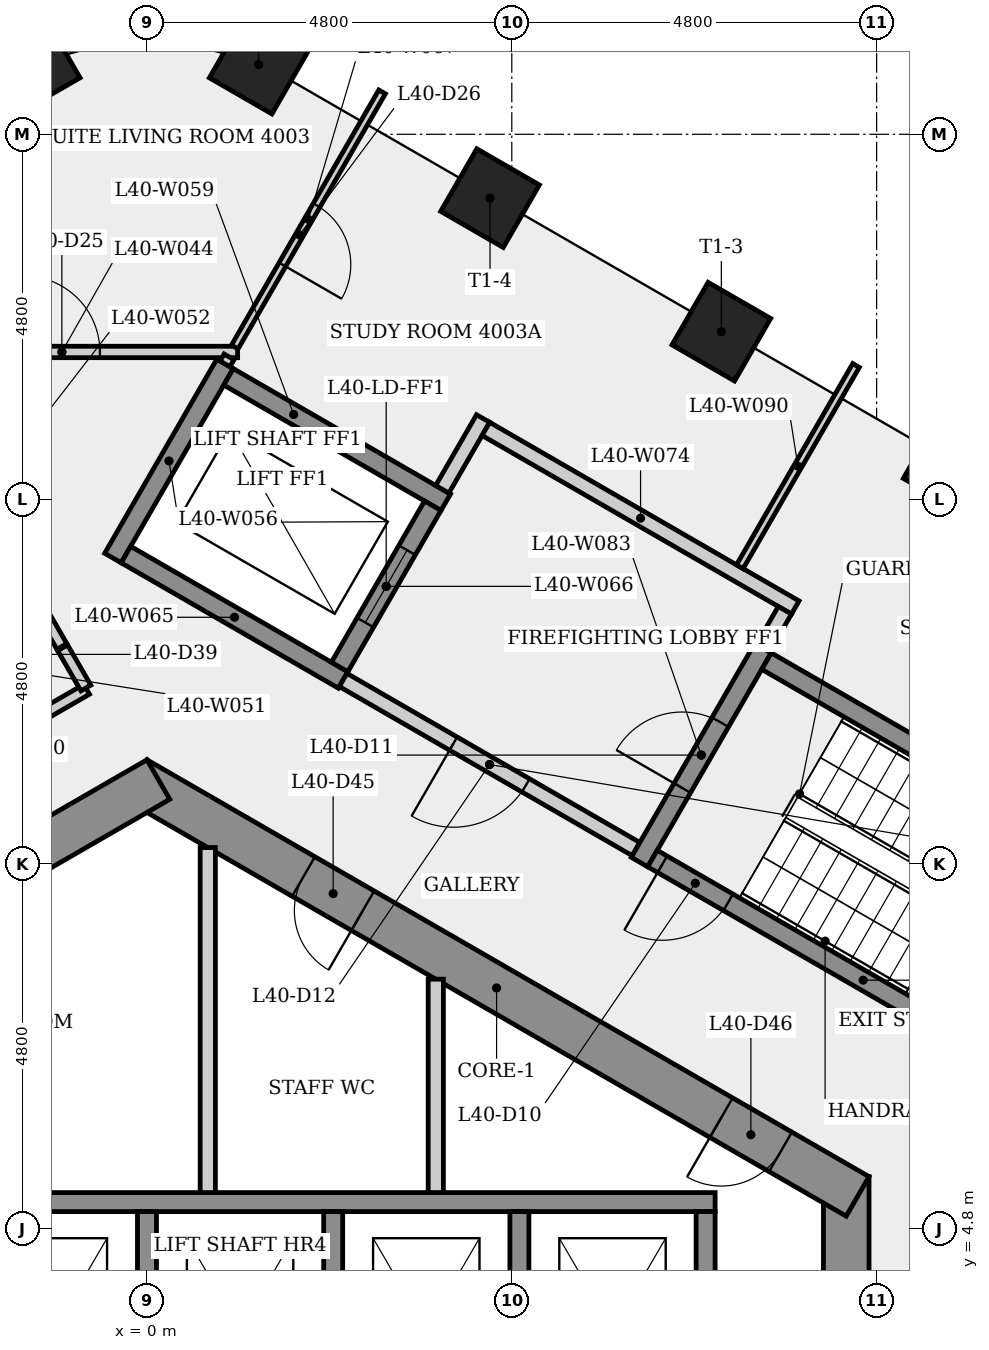
"""IFC4 building model, lengths in metres.
Left out: names, types, materials, properties, quantities, classifications, styles, units other than length and angle.
Written with IfcOpenShell. Run it as: python <this file> out.ifc"""

import sys

from ifc_helpers import new_model, si_unit, direction, frame, frame_2d, origin, origin_2d, place, context, subcontext, project, spatial, rectangle, extrude, element, fill, save


model = new_model("IFC4")
c1 = context("Model", 3, precision=1e-05, world=origin(), true_north=direction((0.0, 1.0)))
c2 = subcontext(c1, "Body", "Model", "MODEL_VIEW")
j1 = project(units=[si_unit("LENGTHUNIT", "METRE"), si_unit("PLANEANGLEUNIT", "RADIAN")], contexts=[c1])
p1 = place(None, origin())
s1 = spatial("IfcSite", under=j1, at=p1, CompositionType="ELEMENT")
p2 = place(p1, origin())
s2 = spatial("IfcBuilding", under=s1, at=p2, CompositionType="ELEMENT")
p3 = place(p2, frame((0.0, 0.0, 152.7)))
s3 = spatial("IfcBuildingStorey", under=s2, at=p3, CompositionType="ELEMENT", Elevation=152.7)
p4 = place(p3, frame((9.2, -5.485, 0.0), z_axis=(0.0, 0.0, 1.0), x_axis=(0.0, 1.0, 0.0)))
e1 = element("IfcWall", 1, at=p4, inside=s3, PredefinedType="SHEAR", context=c2, shape_type="SweptSolid", body=[
    extrude(rectangle(XDim=10.97, YDim=0.6, at=frame_2d((5.485, 0.0))), origin(), (0.0, 0.0, 1.0), 3.4),
])
p5 = place(p4, frame((4.685, 0.0, 0.0)))
e2 = element("IfcOpeningElement", 2, at=p5, cuts=e1, PredefinedType="OPENING", context=c2, shape_type="SweptSolid", body=[
    extrude(rectangle(XDim=1.6, YDim=2.1, at=frame_2d((0.8, 1.05))), frame((0.0, 0.31, 0.0), z_axis=(0.0, -1.0, 0.0), x_axis=(1.0, 0.0, 0.0)), (0.0, 0.0, 1.0), 0.62),
])
p6 = place(p3, frame((9.35, 5.225, 0.0), z_axis=(0.0, 0.0, 1.0), x_axis=(-0.866023993627, 0.500002442456, 0.0)))
e3 = element("IfcWall", 3, at=p6, inside=s3, PredefinedType="SHEAR", context=c2, shape_type="SweptSolid", body=[
    extrude(rectangle(XDim=10.97, YDim=0.6, at=frame_2d((5.485, 0.0))), origin(), (0.0, 0.0, 1.0), 3.4),
])
p7 = place(p6, frame((7.518, 0.0, 0.0)))
e4 = element("IfcOpeningElement", 4, at=p7, cuts=e3, PredefinedType="OPENING", context=c2, shape_type="SweptSolid", body=[
    extrude(rectangle(XDim=0.9, YDim=2.1, at=frame_2d((0.45, 1.05))), frame((0.0, 0.31, 0.0), z_axis=(0.0, -1.0, 0.0), x_axis=(1.0, 0.0, 0.0)), (0.0, 0.0, 1.0), 0.62),
])
p8 = place(p6, frame((1.172, 0.0, 0.0)))
e5 = element("IfcOpeningElement", 5, at=p8, cuts=e3, PredefinedType="OPENING", context=c2, shape_type="SweptSolid", body=[
    extrude(rectangle(XDim=0.9, YDim=2.1, at=frame_2d((0.45, 1.05))), frame((0.0, 0.31, 0.0), z_axis=(0.0, -1.0, 0.0), x_axis=(1.0, 0.0, 0.0)), (0.0, 0.0, 1.0), 0.62),
])
p9 = place(p3, frame((0.15, 10.71, 0.0), z_axis=(0.0, 0.0, 1.0), x_axis=(-0.866023993627, -0.500002442456, 0.0)))
e6 = element("IfcWall", 6, at=p9, inside=s3, PredefinedType="SHEAR", context=c2, shape_type="SweptSolid", body=[
    extrude(rectangle(XDim=10.97, YDim=0.6, at=frame_2d((5.485, 0.0))), origin(), (0.0, 0.0, 1.0), 3.4),
])
p10 = place(p9, frame((6.243, 0.0, 0.0)))
e7 = element("IfcOpeningElement", 7, at=p10, cuts=e6, PredefinedType="OPENING", context=c2, shape_type="SweptSolid", body=[
    extrude(rectangle(XDim=0.9, YDim=2.1, at=frame_2d((0.45, 1.05))), frame((0.0, 0.31, 0.0), z_axis=(0.0, -1.0, 0.0), x_axis=(1.0, 0.0, 0.0)), (0.0, 0.0, 1.0), 0.62),
])
for number, where, z_axis, x_axis in (
    (8, (10.6, 14.846, 0.0), (0.0, 0.0, 1.0), (0.5, 0.866, 0.0)),
    (9, (7.557, 16.603, 0.0), (0.0, 0.0, 1.0), (0.5, 0.866, 0.0)),
    (10, (4.514, 18.36, 0.0), (0.0, 0.0, 1.0), (0.5, 0.866, 0.0)),
    (11, (1.47, 20.117, 0.0), (0.0, 0.0, 1.0), (0.5, 0.866, 0.0)),
    (12, (-1.53, 20.117, 0.0), (0.0, 0.0, 1.0), (-0.5, 0.866, 0.0)),
):
    element("IfcColumn", number, at=place(p3, frame(where, z_axis=z_axis, x_axis=x_axis)), inside=s3, PredefinedType="COLUMN", context=c2, shape_type="SweptSolid", body=[
        extrude(rectangle(XDim=0.95, YDim=0.95, at=origin_2d()), origin(), (0.0, 0.0, 1.0), 3.4),
    ])
p11 = place(p3, frame((-9.841, 6.674, 0.0), z_axis=(0.0, 0.0, 1.0), x_axis=(0.866024077368, 0.500002297414, 0.0)))
e13 = element("IfcWall", 13, at=p11, inside=s3, PredefinedType="PARTITIONING", context=c2, shape_type="SweptSolid", body=[
    extrude(rectangle(XDim=10.447, YDim=0.15, at=frame_2d((5.223, 0.0))), origin(), (0.0, 0.0, 1.0), 3.05),
])
p12 = place(p11, frame((3.832, 0.0, 0.0)))
e14 = element("IfcOpeningElement", 14, at=p12, cuts=e13, PredefinedType="OPENING", context=c2, shape_type="SweptSolid", body=[
    extrude(rectangle(XDim=0.9, YDim=2.1, at=frame_2d((0.45, 1.05))), frame((0.0, 0.085, 0.0), z_axis=(0.0, -1.0, 0.0), x_axis=(1.0, 0.0, 0.0)), (0.0, 0.0, 1.0), 0.17),
])
p13 = place(p3, frame((-7.225, 5.15, 0.0), z_axis=(0.0, 0.0, 1.0), x_axis=(1.0, 0.0, 0.0)))
e15 = element("IfcWall", 15, at=p13, inside=s3, PredefinedType="SHEAR", context=c2, shape_type="SweptSolid", body=[
    extrude(rectangle(XDim=14.7, YDim=0.25, at=frame_2d((7.35, 0.0))), origin(), (0.0, 0.0, 1.0), 3.05),
])
p14 = place(p3, frame((-3.432, 16.336, 0.0), z_axis=(0.0, 0.0, 1.0), x_axis=(1.0, 0.0, 0.0)))
e16 = element("IfcWall", 16, at=p14, inside=s3, PredefinedType="PARTITIONING", context=c2, shape_type="SweptSolid", body=[
    extrude(rectangle(XDim=4.625, YDim=0.15, at=frame_2d((2.312, 0.0))), origin(), (0.0, 0.0, 1.0), 3.05),
])
p15 = place(p14, frame((1.812, 0.0, 0.0)))
e17 = element("IfcOpeningElement", 17, at=p15, cuts=e16, PredefinedType="OPENING", context=c2, shape_type="SweptSolid", body=[
    extrude(rectangle(XDim=1.0, YDim=2.1, at=frame_2d((0.5, 1.05))), frame((0.0, 0.085, 0.0), z_axis=(0.0, -1.0, 0.0), x_axis=(1.0, 0.0, 0.0)), (0.0, 0.0, 1.0), 0.17),
])
p16 = place(p3, frame((-1.12, 12.461, 0.0), z_axis=(0.0, 0.0, 1.0), x_axis=(-0.499970631935, 0.866042358781, 0.0)))
e18 = element("IfcWall", 18, at=p16, inside=s3, PredefinedType="PARTITIONING", context=c2, shape_type="SweptSolid", body=[
    extrude(rectangle(XDim=4.4, YDim=0.15, at=frame_2d((2.2, 0.0))), origin(), (0.0, 0.0, 1.0), 3.05),
])
p17 = place(p16, frame((1.75, 0.0, 0.0)))
e19 = element("IfcOpeningElement", 19, at=p17, cuts=e18, PredefinedType="OPENING", context=c2, shape_type="SweptSolid", body=[
    extrude(rectangle(XDim=0.9, YDim=2.1, at=frame_2d((0.45, 1.05))), frame((0.0, 0.085, 0.0), z_axis=(0.0, -1.0, 0.0), x_axis=(1.0, 0.0, 0.0)), (0.0, 0.0, 1.0), 0.17),
])
p18 = place(p3, frame((-1.11, 12.443, 0.0), z_axis=(0.0, 0.0, 1.0), x_axis=(0.500264283676, -0.865872765756, 0.0)))
e20 = element("IfcWall", 20, at=p18, inside=s3, PredefinedType="PARTITIONING", context=c2, shape_type="SweptSolid", body=[
    extrude(rectangle(XDim=0.611, YDim=0.15, at=frame_2d((0.306, 0.0))), origin(), (0.0, 0.0, 1.0), 3.05),
])
p19 = place(p3, frame((-0.448, 13.624, 0.0), z_axis=(0.0, 0.0, 1.0), x_axis=(0.500037662692, 0.866003658127, 0.0)))
e21 = element("IfcWall", 21, at=p19, inside=s3, PredefinedType="SHEAR", context=c2, shape_type="SweptSolid", body=[
    extrude(rectangle(XDim=2.95, YDim=0.25, at=frame_2d((1.475, 0.0))), origin(), (0.0, 0.0, 1.0), 3.05),
])
p20 = place(p3, frame((0.0, 5.025, 0.0), z_axis=(0.0, 0.0, 1.0), x_axis=(0.0, -1.0, 0.0)))
e22 = element("IfcWall", 22, at=p20, inside=s3, PredefinedType="SHEAR", context=c2, shape_type="SweptSolid", body=[
    extrude(rectangle(XDim=3.1, YDim=0.25, at=frame_2d((1.55, 0.0))), origin(), (0.0, 0.0, 1.0), 3.4),
])
p21 = place(p3, frame((0.8, 9.815, 0.0), z_axis=(0.0, 0.0, 1.0), x_axis=(0.0, -1.0, 0.0)))
e23 = element("IfcWall", 23, at=p21, inside=s3, PredefinedType="PARTITIONING", context=c2, shape_type="SweptSolid", body=[
    extrude(rectangle(XDim=4.54, YDim=0.2, at=frame_2d((2.27, 0.0))), origin(), (0.0, 0.0, 1.0), 3.05),
])
p22 = place(p3, frame((1.073, 16.008, 0.0), z_axis=(0.0, 0.0, 1.0), x_axis=(0.866040211805, -0.499974350878, 0.0)))
e24 = element("IfcWall", 24, at=p22, inside=s3, PredefinedType="SHEAR", context=c2, shape_type="SweptSolid", body=[
    extrude(rectangle(XDim=3.3, YDim=0.25, at=frame_2d((1.65, 0.0))), origin(), (0.0, 0.0, 1.0), 3.05),
])
p23 = place(p3, frame((1.08, 16.271, 0.0), z_axis=(0.0, 0.0, 1.0), x_axis=(-0.498859801958, -0.86668269741, 0.0)))
e25 = element("IfcWall", 25, at=p23, inside=s3, PredefinedType="PARTITIONING", context=c2, shape_type="SweptSolid", body=[
    extrude(rectangle(XDim=0.106, YDim=0.15, at=frame_2d((0.053, 0.0))), origin(), (0.0, 0.0, 1.0), 3.05),
])
p24 = place(p3, frame((2.45, 5.025, 0.0), z_axis=(0.0, 0.0, 1.0), x_axis=(0.0, -1.0, 0.0)))
e26 = element("IfcWall", 26, at=p24, inside=s3, PredefinedType="SHEAR", context=c2, shape_type="SweptSolid", body=[
    extrude(rectangle(XDim=3.1, YDim=0.25, at=frame_2d((1.55, 0.0))), origin(), (0.0, 0.0, 1.0), 3.4),
])
p25 = place(p3, frame((2.581, 12.02, 0.0), z_axis=(0.0, 0.0, 1.0), x_axis=(-0.866040211805, 0.499974350878, 0.0)))
e27 = element("IfcWall", 27, at=p25, inside=s3, PredefinedType="SHEAR", context=c2, shape_type="SweptSolid", body=[
    extrude(rectangle(XDim=3.3, YDim=0.25, at=frame_2d((1.65, 0.0))), origin(), (0.0, 0.0, 1.0), 3.05),
])
p26 = place(p3, frame((2.535, 12.191, 0.0), z_axis=(0.0, 0.0, 1.0), x_axis=(0.500061746146, 0.865989751695, 0.0)))
e28 = element("IfcWall", 28, at=p26, inside=s3, PredefinedType="SHEAR", context=c2, shape_type="SweptSolid", body=[
    extrude(rectangle(XDim=2.45, YDim=0.25, at=frame_2d((1.225, 0.0))), origin(), (0.0, 0.0, 1.0), 3.4),
])
p27 = place(p26, frame((0.675, 0.0, 0.0)))
e29 = element("IfcOpeningElement", 29, at=p27, cuts=e28, PredefinedType="OPENING", context=c2, shape_type="SweptSolid", body=[
    extrude(rectangle(XDim=1.1, YDim=2.1, at=frame_2d((0.55, 1.05))), frame((0.0, 0.135, 0.0), z_axis=(0.0, -1.0, 0.0), x_axis=(1.0, 0.0, 0.0)), (0.0, 0.0, 1.0), 0.27),
])
p28 = place(p3, frame((3.094, 19.758, 0.0), z_axis=(0.0, 0.0, 1.0), x_axis=(-0.500020491252, -0.866013572832, 0.0)))
e30 = element("IfcWall", 30, at=p28, inside=s3, PredefinedType="PARTITIONING", context=c2, shape_type="SweptSolid", body=[
    extrude(rectangle(XDim=3.876, YDim=0.1, at=frame_2d((1.938, 0.0))), origin(), (0.0, 0.0, 1.0), 3.05),
])
p29 = place(p28, frame((1.724, 0.0, 0.0)))
e31 = element("IfcOpeningElement", 31, at=p29, cuts=e30, PredefinedType="OPENING", context=c2, shape_type="SweptSolid", body=[
    extrude(rectangle(XDim=0.9, YDim=2.1, at=frame_2d((0.45, 1.05))), frame((0.0, 0.06, 0.0), z_axis=(0.0, -1.0, 0.0), x_axis=(1.0, 0.0, 0.0)), (0.0, 0.0, 1.0), 0.12),
])
p30 = place(p3, frame((3.8, 8.083, 0.0), z_axis=(0.0, 0.0, 1.0), x_axis=(0.0, -1.0, 0.0)))
e32 = element("IfcWall", 32, at=p30, inside=s3, PredefinedType="PARTITIONING", context=c2, shape_type="SweptSolid", body=[
    extrude(rectangle(XDim=2.808, YDim=0.2, at=frame_2d((1.404, 0.0))), origin(), (0.0, 0.0, 1.0), 3.05),
])
p31 = place(p3, frame((3.885, 14.529, 0.0), z_axis=(0.0, 0.0, 1.0), x_axis=(0.499997628298, 0.866026773083, 0.0)))
e33 = element("IfcWall", 33, at=p31, inside=s3, PredefinedType="PARTITIONING", context=c2, shape_type="SweptSolid", body=[
    extrude(rectangle(XDim=1.075, YDim=0.2, at=frame_2d((0.538, 0.0))), origin(), (0.0, 0.0, 1.0), 3.05),
])
p32 = place(p3, frame((4.459, 15.323, 0.0), z_axis=(0.0, 0.0, 1.0), x_axis=(0.866016039709, -0.500016218704, 0.0)))
e34 = element("IfcWall", 34, at=p32, inside=s3, PredefinedType="PARTITIONING", context=c2, shape_type="SweptSolid", body=[
    extrude(rectangle(XDim=4.7, YDim=0.2, at=frame_2d((2.35, 0.0))), origin(), (0.0, 0.0, 1.0), 3.05),
])
p33 = place(p3, frame((4.9, 5.025, 0.0), z_axis=(0.0, 0.0, 1.0), x_axis=(0.0, -1.0, 0.0)))
e35 = element("IfcWall", 35, at=p33, inside=s3, PredefinedType="SHEAR", context=c2, shape_type="SweptSolid", body=[
    extrude(rectangle(XDim=3.1, YDim=0.25, at=frame_2d((1.55, 0.0))), origin(), (0.0, 0.0, 1.0), 3.4),
])
p34 = place(p3, frame((6.435, 9.795, 0.0), z_axis=(0.0, 0.0, 1.0), x_axis=(-0.866012907634, 0.500021643343, 0.0)))
e36 = element("IfcWall", 36, at=p34, inside=s3, PredefinedType="PARTITIONING", context=c2, shape_type="SweptSolid", body=[
    extrude(rectangle(XDim=4.45, YDim=0.2, at=frame_2d((2.225, 0.0))), origin(), (0.0, 0.0, 1.0), 3.05),
])
p35 = place(p34, frame((1.675, 0.0, 0.0)))
e37 = element("IfcOpeningElement", 37, at=p35, cuts=e36, PredefinedType="OPENING", context=c2, shape_type="SweptSolid", body=[
    extrude(rectangle(XDim=1.1, YDim=2.1, at=frame_2d((0.55, 1.05))), frame((0.0, 0.11, 0.0), z_axis=(0.0, -1.0, 0.0), x_axis=(1.0, 0.0, 0.0)), (0.0, 0.0, 1.0), 0.22),
])
p36 = place(p3, frame((6.48, 9.624, 0.0), z_axis=(0.0, 0.0, 1.0), x_axis=(0.500017246033, 0.866015446554, 0.0)))
e38 = element("IfcWall", 38, at=p36, inside=s3, PredefinedType="SHEAR", context=c2, shape_type="SweptSolid", body=[
    extrude(rectangle(XDim=3.25, YDim=0.25, at=frame_2d((1.625, 0.0))), origin(), (0.0, 0.0, 1.0), 3.05),
])
p37 = place(p36, frame((1.125, 0.0, 0.0)))
e39 = element("IfcOpeningElement", 39, at=p37, cuts=e38, PredefinedType="OPENING", context=c2, shape_type="SweptSolid", body=[
    extrude(rectangle(XDim=1.0, YDim=2.1, at=frame_2d((0.5, 1.05))), frame((0.0, 0.135, 0.0), z_axis=(0.0, -1.0, 0.0), x_axis=(1.0, 0.0, 0.0)), (0.0, 0.0, 1.0), 0.27),
])
p38 = place(p3, frame((7.35, 5.025, 0.0), z_axis=(0.0, 0.0, 1.0), x_axis=(0.0, -1.0, 0.0)))
e40 = element("IfcWall", 40, at=p38, inside=s3, PredefinedType="SHEAR", context=c2, shape_type="SweptSolid", body=[
    extrude(rectangle(XDim=3.1, YDim=0.25, at=frame_2d((1.55, 0.0))), origin(), (0.0, 0.0, 1.0), 3.4),
])
p39 = place(p3, frame((7.8, 13.51, 0.0), z_axis=(0.0, 0.0, 1.0), x_axis=(0.500003532061, 0.866023364538, 0.0)))
e41 = element("IfcWall", 41, at=p39, inside=s3, PredefinedType="PARTITIONING", context=c2, shape_type="SweptSolid", body=[
    extrude(rectangle(XDim=3.058, YDim=0.1, at=frame_2d((1.529, 0.0))), origin(), (0.0, 0.0, 1.0), 3.05),
])
p40 = place(p3, frame((8.151, 12.268, 0.0), z_axis=(0.0, 0.0, 1.0), x_axis=(0.866025499775, -0.499999833739, 0.0)))
e42 = element("IfcWall", 42, at=p40, inside=s3, PredefinedType="SHEAR", context=c2, shape_type="SweptSolid", body=[
    extrude(rectangle(XDim=6.4, YDim=0.25, at=frame_2d((3.2, 0.0))), origin(), (0.0, 0.0, 1.0), 3.05),
])
p41 = place(p3, frame((8.393, 12.937, 0.0), z_axis=(0.0, 0.0, 1.0), x_axis=(-0.500065409566, -0.86598763626, 0.0)))
e43 = element("IfcWall", 43, at=p41, inside=s3, PredefinedType="PARTITIONING", context=c2, shape_type="SweptSolid", body=[
    extrude(rectangle(XDim=0.575, YDim=0.2, at=frame_2d((0.288, 0.0))), origin(), (0.0, 0.0, 1.0), 3.05),
])
p42 = place(p3, frame((12.194, 6.47, 0.0), z_axis=(0.0, 0.0, 1.0), x_axis=(-0.866025499775, 0.499999833739, 0.0)))
e44 = element("IfcWall", 44, at=p42, inside=s3, PredefinedType="SHEAR", context=c2, shape_type="SweptSolid", body=[
    extrude(rectangle(XDim=6.4, YDim=0.25, at=frame_2d((3.2, 0.0))), origin(), (0.0, 0.0, 1.0), 3.05),
])
p43 = place(p42, frame((5.25, 0.0, 0.0)))
e45 = element("IfcOpeningElement", 45, at=p43, cuts=e44, PredefinedType="OPENING", context=c2, shape_type="SweptSolid", body=[
    extrude(rectangle(XDim=1.0, YDim=2.1, at=frame_2d((0.5, 1.05))), frame((0.0, 0.135, 0.0), z_axis=(0.0, -1.0, 0.0), x_axis=(1.0, 0.0, 0.0)), (0.0, 0.0, 1.0), 0.27),
])
p44 = place(p43, origin())
e46 = element("IfcDoor", 46, at=p44, inside=s3, OperationType="SINGLE_SWING_RIGHT", PredefinedType="DOOR", context=c2, shape_type="SweptSolid", body=[
    extrude(rectangle(XDim=1.0, YDim=2.1, at=frame_2d((0.5, 1.05))), frame((0.0, 0.025, 0.0), z_axis=(0.0, -1.0, 0.0), x_axis=(1.0, 0.0, 0.0)), (0.0, 0.0, 1.0), 0.05),
])
fill(e45, e46)
p45 = place(p37, origin())
e47 = element("IfcDoor", 47, at=p45, inside=s3, OperationType="SINGLE_SWING_LEFT", PredefinedType="DOOR", context=c2, shape_type="SweptSolid", body=[
    extrude(rectangle(XDim=1.0, YDim=2.1, at=frame_2d((0.5, 1.05))), frame((0.0, 0.025, 0.0), z_axis=(0.0, -1.0, 0.0), x_axis=(1.0, 0.0, 0.0)), (0.0, 0.0, 1.0), 0.05),
])
fill(e39, e47)
p46 = place(p35, origin())
e48 = element("IfcDoor", 48, at=p46, inside=s3, OperationType="SINGLE_SWING_RIGHT", PredefinedType="DOOR", context=c2, shape_type="SweptSolid", body=[
    extrude(rectangle(XDim=1.1, YDim=2.1, at=frame_2d((0.55, 1.05))), frame((0.0, 0.025, 0.0), z_axis=(0.0, -1.0, 0.0), x_axis=(1.0, 0.0, 0.0)), (0.0, 0.0, 1.0), 0.05),
])
fill(e37, e48)
p47 = place(p27, origin())
e49 = element("IfcDoor", 49, at=p47, inside=s3, OperationType="SLIDING_TO_LEFT", PredefinedType="DOOR", context=c2, shape_type="SweptSolid", body=[
    extrude(rectangle(XDim=1.1, YDim=2.1, at=frame_2d((0.55, 1.05))), frame((0.0, 0.025, 0.0), z_axis=(0.0, -1.0, 0.0), x_axis=(1.0, 0.0, 0.0)), (0.0, 0.0, 1.0), 0.05),
])
fill(e29, e49)
p48 = place(p15, origin())
e50 = element("IfcDoor", 50, at=p48, inside=s3, OperationType="SINGLE_SWING_LEFT", PredefinedType="DOOR", context=c2, shape_type="SweptSolid", body=[
    extrude(rectangle(XDim=1.0, YDim=2.1, at=frame_2d((0.5, 1.05))), frame((0.0, 0.025, 0.0), z_axis=(0.0, -1.0, 0.0), x_axis=(1.0, 0.0, 0.0)), (0.0, 0.0, 1.0), 0.05),
])
fill(e17, e50)
p49 = place(p29, origin())
e51 = element("IfcDoor", 51, at=p49, inside=s3, OperationType="SINGLE_SWING_RIGHT", PredefinedType="DOOR", context=c2, shape_type="SweptSolid", body=[
    extrude(rectangle(XDim=0.9, YDim=2.1, at=frame_2d((0.45, 1.05))), frame((0.0, 0.025, 0.0), z_axis=(0.0, -1.0, 0.0), x_axis=(1.0, 0.0, 0.0)), (0.0, 0.0, 1.0), 0.05),
])
fill(e31, e51)
p50 = place(p7, origin())
e52 = element("IfcDoor", 52, at=p50, inside=s3, OperationType="SINGLE_SWING_LEFT", PredefinedType="DOOR", context=c2, shape_type="SweptSolid", body=[
    extrude(rectangle(XDim=0.9, YDim=2.1, at=frame_2d((0.45, 1.05))), frame((0.0, 0.025, 0.0), z_axis=(0.0, -1.0, 0.0), x_axis=(1.0, 0.0, 0.0)), (0.0, 0.0, 1.0), 0.05),
])
fill(e4, e52)
p51 = place(p8, origin())
e53 = element("IfcDoor", 53, at=p51, inside=s3, OperationType="SINGLE_SWING_RIGHT", PredefinedType="DOOR", context=c2, shape_type="SweptSolid", body=[
    extrude(rectangle(XDim=0.9, YDim=2.1, at=frame_2d((0.45, 1.05))), frame((0.0, 0.025, 0.0), z_axis=(0.0, -1.0, 0.0), x_axis=(1.0, 0.0, 0.0)), (0.0, 0.0, 1.0), 0.05),
])
fill(e5, e53)
save(model, sys.argv[1])
